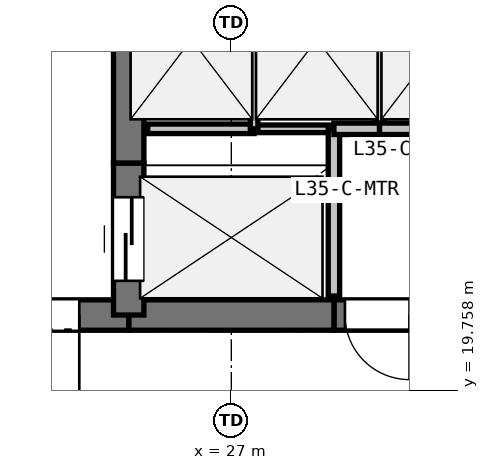
"""IFC4 building model, lengths in metres.
Left out: names, types, materials, properties, quantities, classifications, styles, units other than length and angle.
Written with IfcOpenShell. Run it as: python <this file> out.ifc"""

import sys

from ifc_helpers import new_model, si_unit, direction, frame, frame_2d, origin, place, context, subcontext, project, spatial, rectangle, extrude, element, fill, save


model = new_model("IFC4")
c1 = context("Model", 3, precision=1e-05, world=origin(), true_north=direction((0.0, 1.0)))
c2 = subcontext(c1, "Body", "Model", "MODEL_VIEW")
j1 = project(units=[si_unit("LENGTHUNIT", "METRE"), si_unit("PLANEANGLEUNIT", "RADIAN")], contexts=[c1])
p1 = place(None, origin())
s1 = spatial("IfcSite", under=j1, at=p1, CompositionType="ELEMENT")
p2 = place(p1, origin())
s2 = spatial("IfcBuilding", under=s1, at=p2, CompositionType="ELEMENT")
p3 = place(p2, frame((0.0, 0.0, 127.8)))
s3 = spatial("IfcBuildingStorey", under=s2, at=p3, CompositionType="ELEMENT", Elevation=127.8)
p4 = place(p3, frame((30.6, 20.75, 0.0), z_axis=(0.0, 0.0, 1.0), x_axis=(-1.0, 0.0, 0.0)))
e1 = element("IfcWall", 1, at=p4, inside=s3, PredefinedType="SHEAR", context=c2, shape_type="SweptSolid", body=[
    extrude(rectangle(XDim=2.25, YDim=0.4, at=frame_2d((1.125, 0.0))), origin(), (0.0, 0.0, 1.0), 3.06),
])
p5 = place(p4, frame((1.255, 0.0, 0.0)))
e2 = element("IfcOpeningElement", 2, at=p5, cuts=e1, PredefinedType="OPENING", context=c2, shape_type="SweptSolid", body=[
    extrude(rectangle(XDim=0.85, YDim=2.1, at=frame_2d((0.425, 1.05))), frame((0.0, 0.21, 0.0), z_axis=(0.0, -1.0, 0.0), x_axis=(1.0, 0.0, 0.0)), (0.0, 0.0, 1.0), 0.42),
])
p6 = place(p4, frame((0.17, 0.0, 0.0)))
e3 = element("IfcOpeningElement", 3, at=p6, cuts=e1, PredefinedType="OPENING", context=c2, shape_type="SweptSolid", body=[
    extrude(rectangle(XDim=0.85, YDim=2.1, at=frame_2d((0.425, 1.05))), frame((0.0, 0.21, 0.0), z_axis=(0.0, -1.0, 0.0), x_axis=(1.0, 0.0, 0.0)), (0.0, 0.0, 1.0), 0.42),
])
p7 = place(p3, frame((28.35, 20.75, 0.0), z_axis=(0.0, 0.0, 1.0), x_axis=(-1.0, 0.0, 0.0)))
e4 = element("IfcWall", 4, at=p7, inside=s3, PredefinedType="SHEAR", context=c2, shape_type="SweptSolid", body=[
    extrude(rectangle(XDim=2.7, YDim=0.4, at=frame_2d((1.35, 0.0))), origin(), (0.0, 0.0, 1.0), 3.06),
])
p8 = place(p3, frame((25.65, 20.75, 0.0), z_axis=(0.0, 0.0, 1.0), x_axis=(-1.0, 0.0, 0.0)))
e5 = element("IfcWall", 5, at=p8, inside=s3, PredefinedType="SHEAR", context=c2, shape_type="SweptSolid", body=[
    extrude(rectangle(XDim=3.45, YDim=0.4, at=frame_2d((1.725, 0.0))), origin(), (0.0, 0.0, 1.0), 3.06),
])
p9 = place(p8, frame((0.65, 0.0, 0.0)))
e6 = element("IfcOpeningElement", 6, at=p9, cuts=e5, PredefinedType="OPENING", context=c2, shape_type="SweptSolid", body=[
    extrude(rectangle(XDim=1.15, YDim=2.15, at=frame_2d((0.575, 1.075))), frame((0.0, 0.21, 0.0), z_axis=(0.0, -1.0, 0.0), x_axis=(1.0, 0.0, 0.0)), (0.0, 0.0, 1.0), 0.42),
])
p10 = place(p3, frame((25.65, 20.75, 0.0), z_axis=(0.0, 0.0, 1.0), x_axis=(0.0, 1.0, 0.0)))
e7 = element("IfcWall", 7, at=p10, inside=s3, PredefinedType="SHEAR", context=c2, shape_type="SweptSolid", body=[
    extrude(rectangle(XDim=2.0, YDim=0.4, at=frame_2d((1.0, 0.0))), origin(), (0.0, 0.0, 1.0), 3.06),
])
p11 = place(p10, frame((0.45, 0.0, 0.0)))
e8 = element("IfcOpeningElement", 8, at=p11, cuts=e7, PredefinedType="OPENING", context=c2, shape_type="SweptSolid", body=[
    extrude(rectangle(XDim=1.1, YDim=2.15, at=frame_2d((0.55, 1.075))), frame((0.0, 0.21, 0.0), z_axis=(0.0, -1.0, 0.0), x_axis=(1.0, 0.0, 0.0)), (0.0, 0.0, 1.0), 0.42),
])
p12 = place(p3, frame((25.65, 22.75, 0.0), z_axis=(0.0, 0.0, 1.0), x_axis=(0.0, 1.0, 0.0)))
e9 = element("IfcWall", 9, at=p12, inside=s3, PredefinedType="SHEAR", context=c2, shape_type="SweptSolid", body=[
    extrude(rectangle(XDim=2.8, YDim=0.4, at=frame_2d((1.4, 0.0))), origin(), (0.0, 0.0, 1.0), 3.06),
])
p13 = place(p3, frame((25.9, 23.2, 0.0), z_axis=(0.0, 0.0, 1.0), x_axis=(1.0, 0.0, 0.0)))
e10 = element("IfcWall", 10, at=p13, inside=s3, PredefinedType="PARTITIONING", context=c2, shape_type="SweptSolid", body=[
    extrude(rectangle(XDim=1.4, YDim=0.125, at=frame_2d((0.7, 0.0))), origin(), (0.0, 0.0, 1.0), 3.06),
])
p14 = place(p3, frame((27.3, 23.2, 0.0), z_axis=(0.0, 0.0, 1.0), x_axis=(1.0, 0.0, 0.0)))
e11 = element("IfcWall", 11, at=p14, inside=s3, PredefinedType="PARTITIONING", context=c2, shape_type="SweptSolid", body=[
    extrude(rectangle(XDim=1.05, YDim=0.1, at=frame_2d((0.525, 0.0))), origin(), (0.0, 0.0, 1.0), 3.06),
])
p15 = place(p3, frame((28.35, 23.2, 0.0), z_axis=(0.0, 0.0, 1.0), x_axis=(0.0, -1.0, 0.0)))
e12 = element("IfcWall", 12, at=p15, inside=s3, PredefinedType="PARTITIONING", context=c2, shape_type="SweptSolid", body=[
    extrude(rectangle(XDim=2.2, YDim=0.15, at=frame_2d((1.1, 0.0))), origin(), (0.0, 0.0, 1.0), 3.06),
])
p16 = place(p3, frame((27.3, 25.4, 0.0), z_axis=(0.0, 0.0, 1.0), x_axis=(0.0, -1.0, 0.0)))
e13 = element("IfcWall", 13, at=p16, inside=s3, PredefinedType="PARTITIONING", context=c2, shape_type="SweptSolid", body=[
    extrude(rectangle(XDim=2.2, YDim=0.1, at=frame_2d((1.1, 0.0))), origin(), (0.0, 0.0, 1.0), 3.06),
])
p17 = place(p3, frame((28.95, 25.4, 0.0), z_axis=(0.0, 0.0, 1.0), x_axis=(0.0, -1.0, 0.0)))
e14 = element("IfcWall", 14, at=p17, inside=s3, PredefinedType="PARTITIONING", context=c2, shape_type="SweptSolid", body=[
    extrude(rectangle(XDim=2.2, YDim=0.125, at=frame_2d((1.1, 0.0))), origin(), (0.0, 0.0, 1.0), 3.06),
])
p18 = place(p3, frame((28.95, 23.2, 0.0), z_axis=(0.0, 0.0, 1.0), x_axis=(-1.0, 0.0, 0.0)))
e15 = element("IfcWall", 15, at=p18, inside=s3, PredefinedType="PARTITIONING", context=c2, shape_type="SweptSolid", body=[
    extrude(rectangle(XDim=0.6, YDim=0.15, at=frame_2d((0.3, 0.0))), origin(), (0.0, 0.0, 1.0), 3.06),
])
p19 = place(p3, frame((29.45, 23.2, 0.0), z_axis=(0.0, 0.0, 1.0), x_axis=(-1.0, 0.0, 0.0)))
e16 = element("IfcWall", 16, at=p19, inside=s3, PredefinedType="PARTITIONING", context=c2, shape_type="SweptSolid", body=[
    extrude(rectangle(XDim=0.5, YDim=0.15, at=frame_2d((0.25, 0.0))), origin(), (0.0, 0.0, 1.0), 3.06),
])
p20 = place(p11, origin())
e17 = element("IfcDoor", 17, at=p20, inside=s3, OperationType="SLIDING_TO_LEFT", PredefinedType="DOOR", context=c2, shape_type="SweptSolid", body=[
    extrude(rectangle(XDim=1.1, YDim=2.15, at=frame_2d((0.55, 1.075))), frame((0.0, 0.025, 0.0), z_axis=(0.0, -1.0, 0.0), x_axis=(1.0, 0.0, 0.0)), (0.0, 0.0, 1.0), 0.05),
])
fill(e8, e17)
p21 = place(p9, origin())
e18 = element("IfcDoor", 18, at=p21, inside=s3, OperationType="SINGLE_SWING_LEFT", PredefinedType="DOOR", context=c2, shape_type="SweptSolid", body=[
    extrude(rectangle(XDim=1.15, YDim=2.15, at=frame_2d((0.575, 1.075))), frame((0.0, 0.025, 0.0), z_axis=(0.0, -1.0, 0.0), x_axis=(1.0, 0.0, 0.0)), (0.0, 0.0, 1.0), 0.05),
])
fill(e6, e18)
p22 = place(p5, origin())
e19 = element("IfcDoor", 19, at=p22, inside=s3, OperationType="SINGLE_SWING_LEFT", PredefinedType="DOOR", context=c2, shape_type="SweptSolid", body=[
    extrude(rectangle(XDim=0.85, YDim=2.1, at=frame_2d((0.425, 1.05))), frame((0.0, 0.025, 0.0), z_axis=(0.0, -1.0, 0.0), x_axis=(1.0, 0.0, 0.0)), (0.0, 0.0, 1.0), 0.05),
])
fill(e2, e19)
save(model, sys.argv[1])
